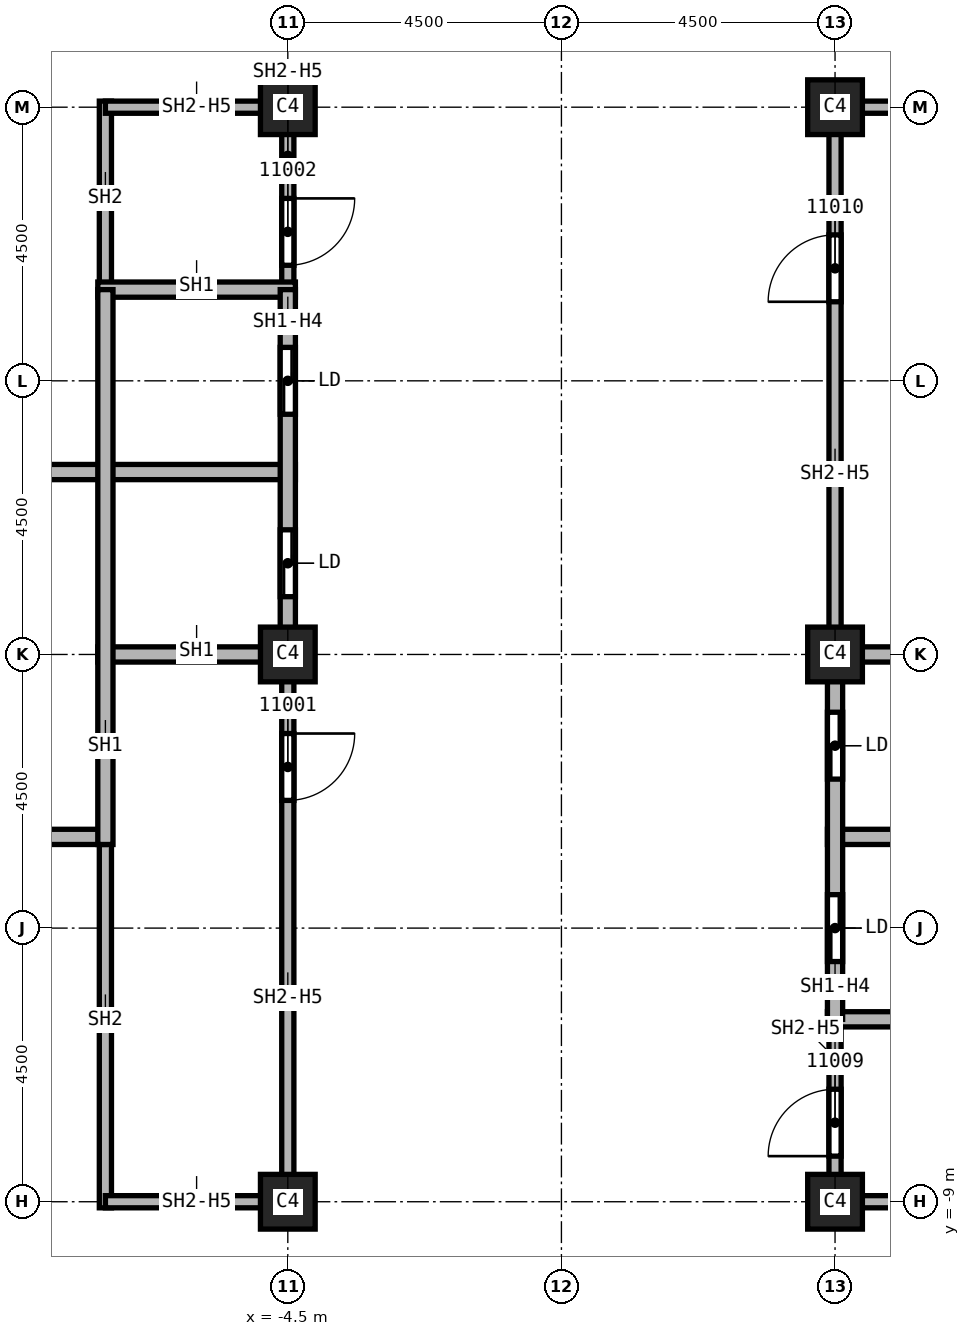
"""IFC4 building model, lengths in metres.
Left out: names, types, materials, properties, quantities, classifications, styles, units other than length and angle.
Written with IfcOpenShell. Run it as: python <this file> out.ifc"""

import sys

from ifc_helpers import new_model, si_unit, direction, frame, frame_2d, origin, origin_2d, place, context, subcontext, project, spatial, rectangle, extrude, element, fill, save


model = new_model("IFC4")
c1 = context("Model", 3, precision=1e-05, world=origin(), true_north=direction((0.0, 1.0)))
c2 = subcontext(c1, "Body", "Model", "MODEL_VIEW")
j1 = project(units=[si_unit("LENGTHUNIT", "METRE"), si_unit("PLANEANGLEUNIT", "RADIAN")], contexts=[c1])
p1 = place(None, origin())
s1 = spatial("IfcSite", under=j1, at=p1, CompositionType="ELEMENT")
p2 = place(p1, origin())
s2 = spatial("IfcBuilding", under=s1, at=p2, CompositionType="ELEMENT")
p3 = place(p2, frame((0.0, 0.0, 188.0)))
s3 = spatial("IfcBuildingStorey", under=s2, at=p3, CompositionType="ELEMENT", Elevation=188.0)
for number, where, z_axis, x_axis in (
    (1, (4.5, 0.0, 0.0), (0.0, 0.0, 1.0), (1.0, 0.0, 0.0)),
    (2, (4.5, 9.0, 0.0), (0.0, 0.0, 1.0), (1.0, 0.0, 0.0)),
    (3, (4.5, -9.0, 0.0), (0.0, 0.0, 1.0), (1.0, 0.0, 0.0)),
    (4, (-4.5, 0.0, 0.0), (0.0, 0.0, 1.0), (1.0, 0.0, 0.0)),
    (5, (-4.5, 9.0, 0.0), (0.0, 0.0, 1.0), (1.0, 0.0, 0.0)),
    (6, (-4.5, -9.0, 0.0), (0.0, 0.0, 1.0), (1.0, 0.0, 0.0)),
):
    element("IfcColumn", number, at=place(p3, frame(where, z_axis=z_axis, x_axis=x_axis)), inside=s3, PredefinedType="COLUMN", context=c2, shape_type="SweptSolid", body=[
        extrude(rectangle(XDim=0.9, YDim=0.9, at=origin_2d()), origin(), (0.0, 0.0, 1.0), 3.72),
    ])
p4 = place(p3, frame((-7.5, -9.1, 0.0), z_axis=(0.0, 0.0, 1.0), x_axis=(0.0, 1.0, 0.0)))
e7 = element("IfcWall", 7, at=p4, inside=s3, PredefinedType="SOLIDWALL", context=c2, shape_type="SweptSolid", body=[
    extrude(rectangle(XDim=6.225, YDim=0.2, at=frame_2d((3.113, 0.0))), origin(), (0.0, 0.0, 1.0), 3.72),
])
p5 = place(p3, frame((-7.5, 6.0, 0.0), z_axis=(0.0, 0.0, 1.0), x_axis=(0.0, 1.0, 0.0)))
e8 = element("IfcWall", 8, at=p5, inside=s3, PredefinedType="SOLIDWALL", context=c2, shape_type="SweptSolid", body=[
    extrude(rectangle(XDim=3.1, YDim=0.2, at=frame_2d((1.55, 0.0))), origin(), (0.0, 0.0, 1.0), 3.72),
])
for number, where, z_axis, x_axis in (
    (9, (-7.5, 9.0, 0.0), (0.0, 0.0, 1.0), (1.0, 0.0, 0.0)),
    (10, (-4.5, -9.0, 0.0), (0.0, 0.0, 1.0), (-1.0, 0.0, 0.0)),
):
    element("IfcWall", number, at=place(p3, frame(where, z_axis=z_axis, x_axis=x_axis)), inside=s3, PredefinedType="SOLIDWALL", context=c2, shape_type="SweptSolid", body=[
        extrude(rectangle(XDim=3.0, YDim=0.2, at=frame_2d((1.5, 0.0))), origin(), (0.0, 0.0, 1.0), 2.958),
    ])
p6 = place(p3, frame((-4.5, 0.0, 0.0), z_axis=(0.0, 0.0, 1.0), x_axis=(0.0, -1.0, 0.0)))
e11 = element("IfcWall", 11, at=p6, inside=s3, PredefinedType="SOLIDWALL", context=c2, shape_type="SweptSolid", body=[
    extrude(rectangle(XDim=9.1, YDim=0.2, at=frame_2d((4.55, 0.0))), origin(), (0.0, 0.0, 1.0), 2.958),
])
p7 = place(p6, frame((1.3, 0.0, 0.0)))
e12 = element("IfcOpeningElement", 12, at=p7, cuts=e11, PredefinedType="OPENING", context=c2, shape_type="SweptSolid", body=[
    extrude(rectangle(XDim=1.1, YDim=2.1, at=frame_2d((0.55, 1.05))), frame((0.0, 0.1, 0.0), z_axis=(0.0, -1.0, 0.0), x_axis=(1.0, 0.0, 0.0)), (0.0, 0.0, 1.0), 0.2),
])
p8 = place(p3, frame((-4.5, 9.1, 0.0), z_axis=(0.0, 0.0, 1.0), x_axis=(0.0, -1.0, 0.0)))
e13 = element("IfcWall", 13, at=p8, inside=s3, PredefinedType="SOLIDWALL", context=c2, shape_type="SweptSolid", body=[
    extrude(rectangle(XDim=3.1, YDim=0.2, at=frame_2d((1.55, 0.0))), origin(), (0.0, 0.0, 1.0), 2.958),
])
p9 = place(p8, frame((1.6, 0.0, 0.0)))
e14 = element("IfcOpeningElement", 14, at=p9, cuts=e13, PredefinedType="OPENING", context=c2, shape_type="SweptSolid", body=[
    extrude(rectangle(XDim=1.1, YDim=2.1, at=frame_2d((0.55, 1.05))), frame((0.0, 0.1, 0.0), z_axis=(0.0, -1.0, 0.0), x_axis=(1.0, 0.0, 0.0)), (0.0, 0.0, 1.0), 0.2),
])
p10 = place(p3, frame((4.5, -9.1, 0.0), z_axis=(0.0, 0.0, 1.0), x_axis=(0.0, 1.0, 0.0)))
e15 = element("IfcWall", 15, at=p10, inside=s3, PredefinedType="SOLIDWALL", context=c2, shape_type="SweptSolid", body=[
    extrude(rectangle(XDim=3.1, YDim=0.2, at=frame_2d((1.55, 0.0))), origin(), (0.0, 0.0, 1.0), 2.958),
])
p11 = place(p10, frame((0.85, 0.0, 0.0)))
e16 = element("IfcOpeningElement", 16, at=p11, cuts=e15, PredefinedType="OPENING", context=c2, shape_type="SweptSolid", body=[
    extrude(rectangle(XDim=1.1, YDim=2.1, at=frame_2d((0.55, 1.05))), frame((0.0, 0.1, 0.0), z_axis=(0.0, -1.0, 0.0), x_axis=(1.0, 0.0, 0.0)), (0.0, 0.0, 1.0), 0.2),
])
p12 = place(p3, frame((4.5, 0.0, 0.0), z_axis=(0.0, 0.0, 1.0), x_axis=(0.0, 1.0, 0.0)))
e17 = element("IfcWall", 17, at=p12, inside=s3, PredefinedType="SOLIDWALL", context=c2, shape_type="SweptSolid", body=[
    extrude(rectangle(XDim=9.1, YDim=0.2, at=frame_2d((4.55, 0.0))), origin(), (0.0, 0.0, 1.0), 2.958),
])
p13 = place(p12, frame((5.8, 0.0, 0.0)))
e18 = element("IfcOpeningElement", 18, at=p13, cuts=e17, PredefinedType="OPENING", context=c2, shape_type="SweptSolid", body=[
    extrude(rectangle(XDim=1.1, YDim=2.1, at=frame_2d((0.55, 1.05))), frame((0.0, 0.1, 0.0), z_axis=(0.0, -1.0, 0.0), x_axis=(1.0, 0.0, 0.0)), (0.0, 0.0, 1.0), 0.2),
])
for number, where, z_axis, x_axis in (
    (19, (4.5, 9.0, 0.0), (0.0, 0.0, 1.0), (1.0, 0.0, 0.0)),
    (20, (7.5, -9.0, 0.0), (0.0, 0.0, 1.0), (-1.0, 0.0, 0.0)),
):
    element("IfcWall", number, at=place(p3, frame(where, z_axis=z_axis, x_axis=x_axis)), inside=s3, PredefinedType="SOLIDWALL", context=c2, shape_type="SweptSolid", body=[
        extrude(rectangle(XDim=3.0, YDim=0.2, at=frame_2d((1.5, 0.0))), origin(), (0.0, 0.0, 1.0), 2.958),
    ])
p14 = place(p3, frame((-13.625, 3.0, 0.0), z_axis=(0.0, 0.0, 1.0), x_axis=(1.0, 0.0, 0.0)))
e21 = element("IfcWall", 21, at=p14, inside=s3, PredefinedType="SOLIDWALL", context=c2, shape_type="SweptSolid", body=[
    extrude(rectangle(XDim=9.25, YDim=0.25, at=frame_2d((4.625, 0.0))), origin(), (0.0, 0.0, 1.0), 3.72),
])
p15 = place(p14, frame((3.25, 0.0, 0.0)))
e22 = element("IfcOpeningElement", 22, at=p15, cuts=e21, PredefinedType="OPENING", context=c2, shape_type="SweptSolid", body=[
    extrude(rectangle(XDim=1.1, YDim=2.1, at=frame_2d((0.55, 1.05))), frame((0.0, 0.125, 0.0), z_axis=(0.0, -1.0, 0.0), x_axis=(1.0, 0.0, 0.0)), (0.0, 0.0, 1.0), 0.25),
])
p16 = place(p3, frame((-13.625, -3.0, 0.0), z_axis=(0.0, 0.0, 1.0), x_axis=(1.0, 0.0, 0.0)))
e23 = element("IfcWall", 23, at=p16, inside=s3, PredefinedType="SOLIDWALL", context=c2, shape_type="SweptSolid", body=[
    extrude(rectangle(XDim=6.125, YDim=0.25, at=frame_2d((3.062, 0.0))), origin(), (0.0, 0.0, 1.0), 3.72),
])
p17 = place(p16, frame((3.25, 0.0, 0.0)))
e24 = element("IfcOpeningElement", 24, at=p17, cuts=e23, PredefinedType="OPENING", context=c2, shape_type="SweptSolid", body=[
    extrude(rectangle(XDim=1.1, YDim=2.1, at=frame_2d((0.55, 1.05))), frame((0.0, 0.125, 0.0), z_axis=(0.0, -1.0, 0.0), x_axis=(1.0, 0.0, 0.0)), (0.0, 0.0, 1.0), 0.25),
])
for number, where, z_axis, x_axis in (
    (25, (-7.625, 0.0, 0.0), (0.0, 0.0, 1.0), (1.0, 0.0, 0.0)),
    (26, (-7.625, 6.0, 0.0), (0.0, 0.0, 1.0), (1.0, 0.0, 0.0)),
):
    element("IfcWall", number, at=place(p3, frame(where, z_axis=z_axis, x_axis=x_axis)), inside=s3, PredefinedType="SOLIDWALL", context=c2, shape_type="SweptSolid", body=[
        extrude(rectangle(XDim=3.25, YDim=0.25, at=frame_2d((1.625, 0.0))), origin(), (0.0, 0.0, 1.0), 3.72),
    ])
p18 = place(p3, frame((-7.5, -3.125, 0.0), z_axis=(0.0, 0.0, 1.0), x_axis=(0.0, 1.0, 0.0)))
e27 = element("IfcWall", 27, at=p18, inside=s3, PredefinedType="SOLIDWALL", context=c2, shape_type="SweptSolid", body=[
    extrude(rectangle(XDim=9.125, YDim=0.25, at=frame_2d((4.562, 0.0))), origin(), (0.0, 0.0, 1.0), 3.72),
])
p19 = place(p3, frame((-4.5, 6.0, 0.0), z_axis=(0.0, 0.0, 1.0), x_axis=(0.0, -1.0, 0.0)))
e28 = element("IfcWall", 28, at=p19, inside=s3, PredefinedType="SOLIDWALL", context=c2, shape_type="SweptSolid", body=[
    extrude(rectangle(XDim=6.0, YDim=0.25, at=frame_2d((3.0, 0.0))), origin(), (0.0, 0.0, 1.0), 2.958),
])
p20 = place(p19, frame((3.95, 0.0, 0.0)))
e29 = element("IfcOpeningElement", 29, at=p20, cuts=e28, PredefinedType="OPENING", context=c2, shape_type="SweptSolid", body=[
    extrude(rectangle(XDim=1.1, YDim=2.1, at=frame_2d((0.55, 1.05))), frame((0.0, 0.125, 0.0), z_axis=(0.0, -1.0, 0.0), x_axis=(1.0, 0.0, 0.0)), (0.0, 0.0, 1.0), 0.25),
])
p21 = place(p19, frame((0.95, 0.0, 0.0)))
e30 = element("IfcOpeningElement", 30, at=p21, cuts=e28, PredefinedType="OPENING", context=c2, shape_type="SweptSolid", body=[
    extrude(rectangle(XDim=1.1, YDim=2.1, at=frame_2d((0.55, 1.05))), frame((0.0, 0.125, 0.0), z_axis=(0.0, -1.0, 0.0), x_axis=(1.0, 0.0, 0.0)), (0.0, 0.0, 1.0), 0.25),
])
p22 = place(p3, frame((4.375, -6.0, 0.0), z_axis=(0.0, 0.0, 1.0), x_axis=(1.0, 0.0, 0.0)))
e31 = element("IfcWall", 31, at=p22, inside=s3, PredefinedType="SOLIDWALL", context=c2, shape_type="SweptSolid", body=[
    extrude(rectangle(XDim=3.25, YDim=0.25, at=frame_2d((1.625, 0.0))), origin(), (0.0, 0.0, 1.0), 3.72),
])
p23 = place(p3, frame((4.375, -3.0, 0.0), z_axis=(0.0, 0.0, 1.0), x_axis=(1.0, 0.0, 0.0)))
e32 = element("IfcWall", 32, at=p23, inside=s3, PredefinedType="SOLIDWALL", context=c2, shape_type="SweptSolid", body=[
    extrude(rectangle(XDim=9.25, YDim=0.25, at=frame_2d((4.625, 0.0))), origin(), (0.0, 0.0, 1.0), 3.72),
])
p24 = place(p23, frame((4.125, 0.0, 0.0)))
e33 = element("IfcOpeningElement", 33, at=p24, cuts=e32, PredefinedType="OPENING", context=c2, shape_type="SweptSolid", body=[
    extrude(rectangle(XDim=1.1, YDim=2.1, at=frame_2d((0.55, 1.05))), frame((0.0, 0.125, 0.0), z_axis=(0.0, -1.0, 0.0), x_axis=(1.0, 0.0, 0.0)), (0.0, 0.0, 1.0), 0.25),
])
p25 = place(p3, frame((4.375, 0.0, 0.0), z_axis=(0.0, 0.0, 1.0), x_axis=(1.0, 0.0, 0.0)))
e34 = element("IfcWall", 34, at=p25, inside=s3, PredefinedType="SOLIDWALL", context=c2, shape_type="SweptSolid", body=[
    extrude(rectangle(XDim=3.25, YDim=0.25, at=frame_2d((1.625, 0.0))), origin(), (0.0, 0.0, 1.0), 3.72),
])
p26 = place(p3, frame((4.5, -6.0, 0.0), z_axis=(0.0, 0.0, 1.0), x_axis=(0.0, 1.0, 0.0)))
e35 = element("IfcWall", 35, at=p26, inside=s3, PredefinedType="SOLIDWALL", context=c2, shape_type="SweptSolid", body=[
    extrude(rectangle(XDim=6.0, YDim=0.25, at=frame_2d((3.0, 0.0))), origin(), (0.0, 0.0, 1.0), 2.958),
])
p27 = place(p26, frame((0.95, 0.0, 0.0)))
e36 = element("IfcOpeningElement", 36, at=p27, cuts=e35, PredefinedType="OPENING", context=c2, shape_type="SweptSolid", body=[
    extrude(rectangle(XDim=1.1, YDim=2.1, at=frame_2d((0.55, 1.05))), frame((0.0, 0.125, 0.0), z_axis=(0.0, -1.0, 0.0), x_axis=(1.0, 0.0, 0.0)), (0.0, 0.0, 1.0), 0.25),
])
p28 = place(p26, frame((3.95, 0.0, 0.0)))
e37 = element("IfcOpeningElement", 37, at=p28, cuts=e35, PredefinedType="OPENING", context=c2, shape_type="SweptSolid", body=[
    extrude(rectangle(XDim=1.1, YDim=2.1, at=frame_2d((0.55, 1.05))), frame((0.0, 0.125, 0.0), z_axis=(0.0, -1.0, 0.0), x_axis=(1.0, 0.0, 0.0)), (0.0, 0.0, 1.0), 0.25),
])
p29 = place(p7, origin())
e38 = element("IfcDoor", 38, at=p29, inside=s3, OperationType="SINGLE_SWING_RIGHT", PredefinedType="DOOR", context=c2, shape_type="SweptSolid", body=[
    extrude(rectangle(XDim=1.1, YDim=2.1, at=frame_2d((0.55, 1.05))), frame((0.0, 0.025, 0.0), z_axis=(0.0, -1.0, 0.0), x_axis=(1.0, 0.0, 0.0)), (0.0, 0.0, 1.0), 0.05),
])
fill(e12, e38)
p30 = place(p9, origin())
e39 = element("IfcDoor", 39, at=p30, inside=s3, OperationType="SINGLE_SWING_LEFT", PredefinedType="DOOR", context=c2, shape_type="SweptSolid", body=[
    extrude(rectangle(XDim=1.1, YDim=2.1, at=frame_2d((0.55, 1.05))), frame((0.0, 0.025, 0.0), z_axis=(0.0, -1.0, 0.0), x_axis=(1.0, 0.0, 0.0)), (0.0, 0.0, 1.0), 0.05),
])
fill(e14, e39)
p31 = place(p11, origin())
e40 = element("IfcDoor", 40, at=p31, inside=s3, OperationType="SINGLE_SWING_RIGHT", PredefinedType="DOOR", context=c2, shape_type="SweptSolid", body=[
    extrude(rectangle(XDim=1.1, YDim=2.1, at=frame_2d((0.55, 1.05))), frame((0.0, 0.025, 0.0), z_axis=(0.0, -1.0, 0.0), x_axis=(1.0, 0.0, 0.0)), (0.0, 0.0, 1.0), 0.05),
])
fill(e16, e40)
p32 = place(p13, origin())
e41 = element("IfcDoor", 41, at=p32, inside=s3, OperationType="SINGLE_SWING_LEFT", PredefinedType="DOOR", context=c2, shape_type="SweptSolid", body=[
    extrude(rectangle(XDim=1.1, YDim=2.1, at=frame_2d((0.55, 1.05))), frame((0.0, 0.025, 0.0), z_axis=(0.0, -1.0, 0.0), x_axis=(1.0, 0.0, 0.0)), (0.0, 0.0, 1.0), 0.05),
])
fill(e18, e41)
p33 = place(p20, origin())
e42 = element("IfcDoor", 42, at=p33, inside=s3, OperationType="SLIDING_TO_LEFT", PredefinedType="DOOR", context=c2, shape_type="SweptSolid", body=[
    extrude(rectangle(XDim=1.1, YDim=2.1, at=frame_2d((0.55, 1.05))), frame((0.0, 0.025, 0.0), z_axis=(0.0, -1.0, 0.0), x_axis=(1.0, 0.0, 0.0)), (0.0, 0.0, 1.0), 0.05),
])
fill(e29, e42)
p34 = place(p21, origin())
e43 = element("IfcDoor", 43, at=p34, inside=s3, OperationType="SLIDING_TO_LEFT", PredefinedType="DOOR", context=c2, shape_type="SweptSolid", body=[
    extrude(rectangle(XDim=1.1, YDim=2.1, at=frame_2d((0.55, 1.05))), frame((0.0, 0.025, 0.0), z_axis=(0.0, -1.0, 0.0), x_axis=(1.0, 0.0, 0.0)), (0.0, 0.0, 1.0), 0.05),
])
fill(e30, e43)
p35 = place(p27, origin())
e44 = element("IfcDoor", 44, at=p35, inside=s3, OperationType="SLIDING_TO_LEFT", PredefinedType="DOOR", context=c2, shape_type="SweptSolid", body=[
    extrude(rectangle(XDim=1.1, YDim=2.1, at=frame_2d((0.55, 1.05))), frame((0.0, 0.025, 0.0), z_axis=(0.0, -1.0, 0.0), x_axis=(1.0, 0.0, 0.0)), (0.0, 0.0, 1.0), 0.05),
])
fill(e36, e44)
p36 = place(p28, origin())
e45 = element("IfcDoor", 45, at=p36, inside=s3, OperationType="SLIDING_TO_LEFT", PredefinedType="DOOR", context=c2, shape_type="SweptSolid", body=[
    extrude(rectangle(XDim=1.1, YDim=2.1, at=frame_2d((0.55, 1.05))), frame((0.0, 0.025, 0.0), z_axis=(0.0, -1.0, 0.0), x_axis=(1.0, 0.0, 0.0)), (0.0, 0.0, 1.0), 0.05),
])
fill(e37, e45)
save(model, sys.argv[1])
